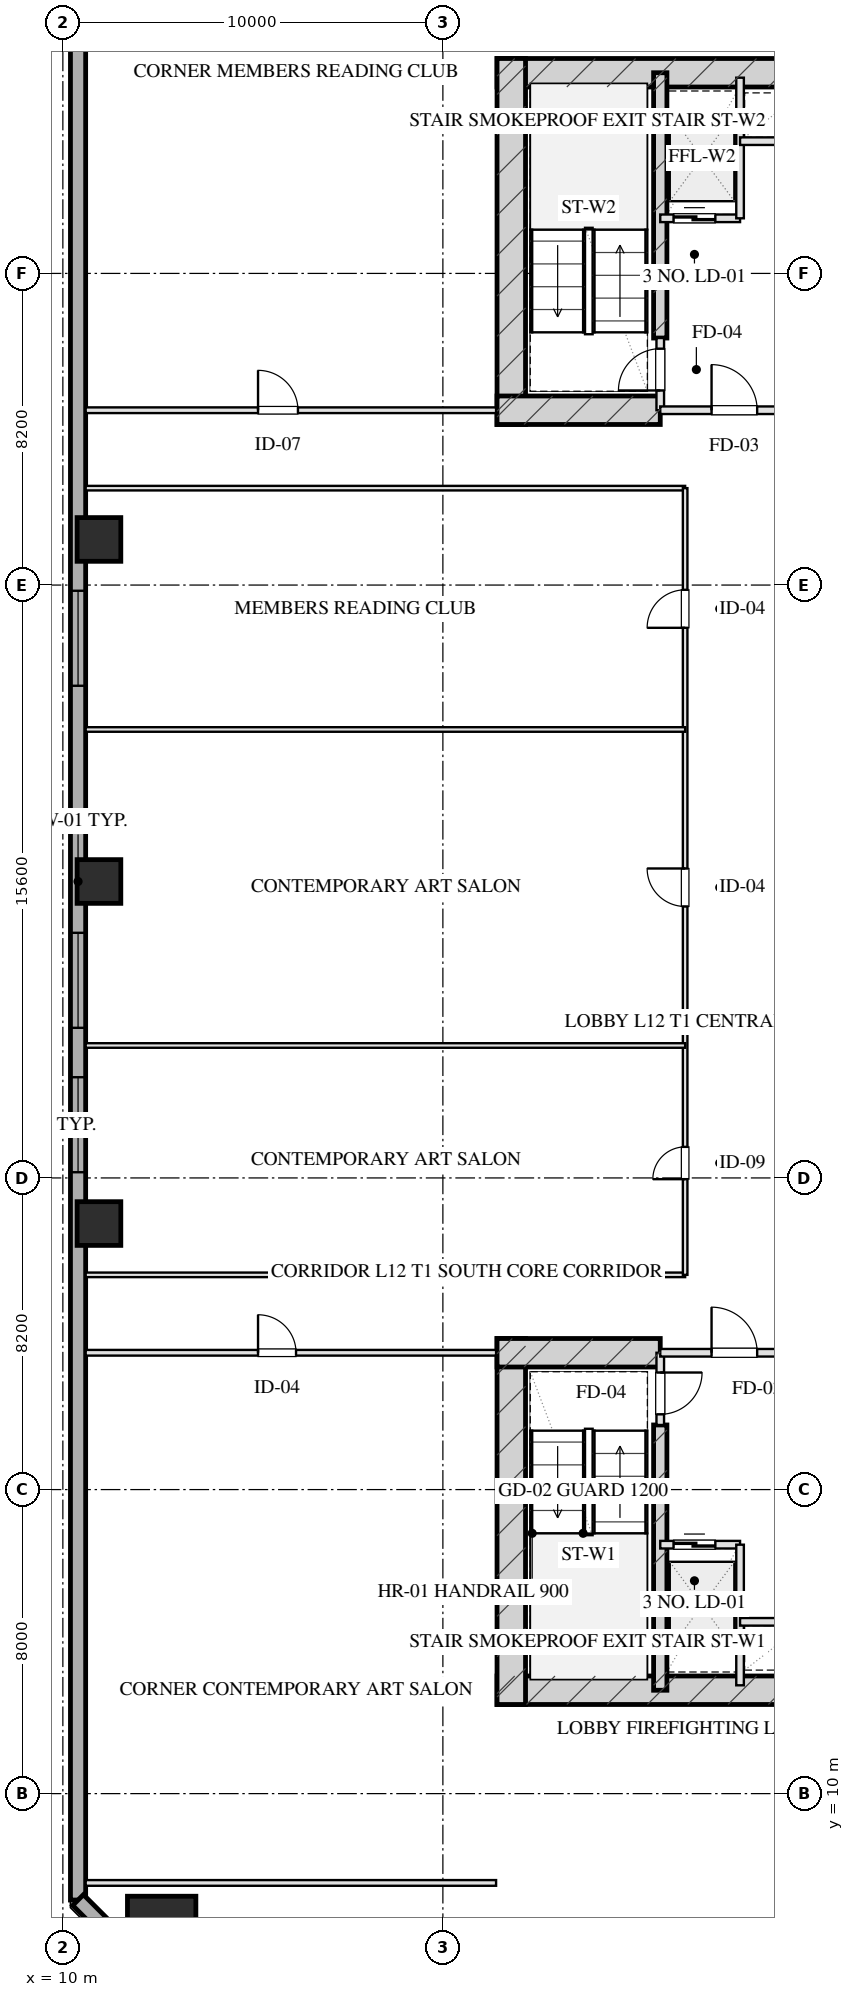
"""IFC4 building model, lengths in metres.
Left out: names, types, materials, properties, quantities, classifications, styles, units other than length and angle.
Written with IfcOpenShell. Run it as: python <this file> out.ifc"""

import sys

from ifc_helpers import new_model, si_unit, direction, frame, frame_2d, origin, origin_2d, place, context, subcontext, project, spatial, rectangle, hollow_rectangle, extrude, element, fill, save


model = new_model("IFC4")
c1 = context("Model", 3, precision=1e-05, world=origin(), true_north=direction((0.0, 1.0)))
c2 = subcontext(c1, "Body", "Model", "MODEL_VIEW")
j1 = project(units=[si_unit("LENGTHUNIT", "METRE"), si_unit("PLANEANGLEUNIT", "RADIAN")], contexts=[c1])
p1 = place(None, origin())
s1 = spatial("IfcSite", under=j1, at=p1, CompositionType="ELEMENT")
p2 = place(p1, origin())
s2 = spatial("IfcBuilding", under=s1, at=p2, CompositionType="ELEMENT")
p3 = place(p2, frame((0.0, 0.0, 54.05)))
s3 = spatial("IfcBuildingStorey", under=s2, at=p3, CompositionType="ELEMENT", Elevation=54.05)
p4 = place(p3, frame((21.425, 12.72, 0.0), z_axis=(0.0, 0.0, 1.0), x_axis=(1.0, 0.0, 0.0)))
e1 = element("IfcWall", 1, at=p4, inside=s3, PredefinedType="SHEAR", context=c2, shape_type="SweptSolid", body=[
    extrude(rectangle(XDim=17.15, YDim=0.75, at=frame_2d((8.575, 0.0))), origin(), (0.0, 0.0, 1.0), 3.45),
])
p5 = place(p3, frame((21.8, 21.975, 0.0), z_axis=(0.0, 0.0, 1.0), x_axis=(0.0, -1.0, 0.0)))
e2 = element("IfcWall", 2, at=p5, inside=s3, PredefinedType="SHEAR", context=c2, shape_type="SweptSolid", body=[
    extrude(rectangle(XDim=9.63, YDim=0.75, at=frame_2d((4.815, 0.0))), origin(), (0.0, 0.0, 1.0), 3.45),
])
p6 = place(p3, frame((25.72, 19.7, 0.0), z_axis=(0.0, 0.0, 1.0), x_axis=(0.0, -1.0, 0.0)))
e3 = element("IfcWall", 3, at=p6, inside=s3, PredefinedType="SHEAR", context=c2, shape_type="SweptSolid", body=[
    extrude(rectangle(XDim=6.98, YDim=0.35, at=frame_2d((3.49, 0.0))), origin(), (0.0, 0.0, 1.0), 3.45),
])
p7 = place(p3, frame((21.425, 21.6, 0.0), z_axis=(0.0, 0.0, 1.0), x_axis=(1.0, 0.0, 0.0)))
e4 = element("IfcWall", 4, at=p7, inside=s3, PredefinedType="SHEAR", context=c2, shape_type="SweptSolid", body=[
    extrude(rectangle(XDim=4.295, YDim=0.75, at=frame_2d((2.147, 0.0))), origin(), (0.0, 0.0, 1.0), 3.45),
])
p8 = place(p3, frame((21.425, 55.28, 0.0), z_axis=(0.0, 0.0, 1.0), x_axis=(1.0, 0.0, 0.0)))
e5 = element("IfcWall", 5, at=p8, inside=s3, PredefinedType="SHEAR", context=c2, shape_type="SweptSolid", body=[
    extrude(rectangle(XDim=17.15, YDim=0.75, at=frame_2d((8.575, 0.0))), origin(), (0.0, 0.0, 1.0), 3.45),
])
p9 = place(p3, frame((21.8, 46.025, 0.0), z_axis=(0.0, 0.0, 1.0), x_axis=(0.0, 1.0, 0.0)))
e6 = element("IfcWall", 6, at=p9, inside=s3, PredefinedType="SHEAR", context=c2, shape_type="SweptSolid", body=[
    extrude(rectangle(XDim=9.63, YDim=0.75, at=frame_2d((4.815, 0.0))), origin(), (0.0, 0.0, 1.0), 3.45),
])
p10 = place(p3, frame((25.72, 48.3, 0.0), z_axis=(0.0, 0.0, 1.0), x_axis=(0.0, 1.0, 0.0)))
e7 = element("IfcWall", 7, at=p10, inside=s3, PredefinedType="SHEAR", context=c2, shape_type="SweptSolid", body=[
    extrude(rectangle(XDim=6.98, YDim=0.35, at=frame_2d((3.49, 0.0))), origin(), (0.0, 0.0, 1.0), 3.45),
])
p11 = place(p3, frame((21.425, 46.4, 0.0), z_axis=(0.0, 0.0, 1.0), x_axis=(1.0, 0.0, 0.0)))
e8 = element("IfcWall", 8, at=p11, inside=s3, PredefinedType="SHEAR", context=c2, shape_type="SweptSolid", body=[
    extrude(rectangle(XDim=4.295, YDim=0.75, at=frame_2d((2.147, 0.0))), origin(), (0.0, 0.0, 1.0), 3.45),
])
p12 = place(p3, frame((12.6, 6.4, 0.0), z_axis=(0.0, 0.0, 1.0), x_axis=(1.0, 0.0, 0.0)))
e9 = element("IfcColumn", 9, at=p12, inside=s3, PredefinedType="COLUMN", context=c2, shape_type="SweptSolid", body=[
    extrude(hollow_rectangle(XDim=1.8, YDim=1.8, WallThickness=0.06, at=origin_2d()), origin(), (0.0, 0.0, 1.0), 3.451),
])
for number, where, z_axis, x_axis in (
    (10, (10.95, 25.0, 0.0), (0.0, 0.0, 1.0), (1.0, 0.0, 0.0)),
    (11, (10.95, 34.0, 0.0), (0.0, 0.0, 1.0), (1.0, 0.0, 0.0)),
    (12, (10.95, 43.0, 0.0), (0.0, 0.0, 1.0), (1.0, 0.0, 0.0)),
):
    element("IfcColumn", number, at=place(p3, frame(where, z_axis=z_axis, x_axis=x_axis)), inside=s3, PredefinedType="COLUMN", context=c2, shape_type="SweptSolid", body=[
        extrude(hollow_rectangle(XDim=1.15, YDim=1.15, WallThickness=0.04, at=origin_2d()), origin(), (0.0, 0.0, 1.0), 3.451),
    ])
p13 = place(p3, frame((10.4, 7.2, 0.0), z_axis=(0.0, 0.0, 1.0), x_axis=(0.0, 1.0, 0.0)))
e13 = element("IfcWall", 13, at=p13, inside=s3, PredefinedType="SOLIDWALL", context=c2, shape_type="SweptSolid", body=[
    extrude(rectangle(XDim=53.6, YDim=0.4, at=frame_2d((26.8, 0.0))), origin(), (0.0, 0.0, 1.0), 2.61),
])
p14 = place(p13, frame((19.15, 0.0, 0.75)))
e14 = element("IfcOpeningElement", 14, at=p14, cuts=e13, PredefinedType="OPENING", context=c2, shape_type="SweptSolid", body=[
    extrude(rectangle(XDim=2.5, YDim=1.46, at=frame_2d((1.25, 0.73))), frame((0.0, 0.21, 0.0), z_axis=(0.0, -1.0, 0.0), x_axis=(1.0, 0.0, 0.0)), (0.0, 0.0, 1.0), 0.42),
])
p15 = place(p13, frame((22.95, 0.0, 0.75)))
e15 = element("IfcOpeningElement", 15, at=p15, cuts=e13, PredefinedType="OPENING", context=c2, shape_type="SweptSolid", body=[
    extrude(rectangle(XDim=2.5, YDim=1.46, at=frame_2d((1.25, 0.73))), frame((0.0, 0.21, 0.0), z_axis=(0.0, -1.0, 0.0), x_axis=(1.0, 0.0, 0.0)), (0.0, 0.0, 1.0), 0.42),
])
p16 = place(p13, frame((31.95, 0.0, 0.75)))
e16 = element("IfcOpeningElement", 16, at=p16, cuts=e13, PredefinedType="OPENING", context=c2, shape_type="SweptSolid", body=[
    extrude(rectangle(XDim=2.5, YDim=1.46, at=frame_2d((1.25, 0.73))), frame((0.0, 0.21, 0.0), z_axis=(0.0, -1.0, 0.0), x_axis=(1.0, 0.0, 0.0)), (0.0, 0.0, 1.0), 0.42),
])
p17 = place(p3, frame((13.4, 4.2, 0.0), z_axis=(0.0, 0.0, 1.0), x_axis=(-0.707106781187, 0.707106781187, 0.0)))
e17 = element("IfcWall", 17, at=p17, inside=s3, PredefinedType="SOLIDWALL", context=c2, shape_type="SweptSolid", body=[
    extrude(rectangle(XDim=4.243, YDim=0.4, at=frame_2d((2.121, 0.0))), origin(), (0.0, 0.0, 1.0), 2.61),
])
p18 = place(p3, frame((25.72, 21.6, 0.0), z_axis=(0.0, 0.0, 1.0), x_axis=(0.0, -1.0, 0.0)))
e18 = element("IfcWall", 18, at=p18, inside=s3, PredefinedType="PARTITIONING", context=c2, shape_type="SweptSolid", body=[
    extrude(rectangle(XDim=1.9, YDim=0.2, at=frame_2d((0.95, 0.0))), origin(), (0.0, 0.0, 1.0), 3.175),
])
p19 = place(p18, frame((0.52, 0.0, 0.0)))
e19 = element("IfcOpeningElement", 19, at=p19, cuts=e18, PredefinedType="OPENING", context=c2, shape_type="SweptSolid", body=[
    extrude(rectangle(XDim=1.1, YDim=2.05, at=frame_2d((0.55, 1.025))), frame((0.0, 0.11, 0.0), z_axis=(0.0, -1.0, 0.0), x_axis=(1.0, 0.0, 0.0)), (0.0, 0.0, 1.0), 0.22),
])
p20 = place(p3, frame((25.72, 21.6, 0.0), z_axis=(0.0, 0.0, 1.0), x_axis=(1.0, 0.0, 0.0)))
e20 = element("IfcWall", 20, at=p20, inside=s3, PredefinedType="PARTITIONING", context=c2, shape_type="SweptSolid", body=[
    extrude(rectangle(XDim=3.83, YDim=0.2, at=frame_2d((1.915, 0.0))), origin(), (0.0, 0.0, 1.0), 3.175),
])
p21 = place(p20, frame((1.35, 0.0, 0.0)))
e21 = element("IfcOpeningElement", 21, at=p21, cuts=e20, PredefinedType="OPENING", context=c2, shape_type="SweptSolid", body=[
    extrude(rectangle(XDim=1.2, YDim=2.05, at=frame_2d((0.6, 1.025))), frame((0.0, 0.11, 0.0), z_axis=(0.0, -1.0, 0.0), x_axis=(1.0, 0.0, 0.0)), (0.0, 0.0, 1.0), 0.22),
])
p22 = place(p3, frame((25.72, 16.55, 0.0), z_axis=(0.0, 0.0, 1.0), x_axis=(1.0, 0.0, 0.0)))
e22 = element("IfcWall", 22, at=p22, inside=s3, PredefinedType="PARTITIONING", context=c2, shape_type="SweptSolid", body=[
    extrude(rectangle(XDim=2.1, YDim=0.2, at=frame_2d((1.05, 0.0))), origin(), (0.0, 0.0, 1.0), 3.175),
])
p23 = place(p22, frame((0.35, 0.0, 0.0)))
e23 = element("IfcOpeningElement", 23, at=p23, cuts=e22, PredefinedType="OPENING", context=c2, shape_type="SweptSolid", body=[
    extrude(rectangle(XDim=1.1, YDim=2.05, at=frame_2d((0.55, 1.025))), frame((0.0, 0.11, 0.0), z_axis=(0.0, -1.0, 0.0), x_axis=(1.0, 0.0, 0.0)), (0.0, 0.0, 1.0), 0.22),
])
p24 = place(p3, frame((27.82, 16.55, 0.0), z_axis=(0.0, 0.0, 1.0), x_axis=(0.0, -1.0, 0.0)))
e24 = element("IfcWall", 24, at=p24, inside=s3, PredefinedType="PARTITIONING", context=c2, shape_type="SweptSolid", body=[
    extrude(rectangle(XDim=3.7, YDim=0.2, at=frame_2d((1.85, 0.0))), origin(), (0.0, 0.0, 1.0), 3.175),
])
p25 = place(p3, frame((27.82, 14.52, 0.0), z_axis=(0.0, 0.0, 1.0), x_axis=(1.0, 0.0, 0.0)))
e25 = element("IfcWall", 25, at=p25, inside=s3, PredefinedType="PARTITIONING", context=c2, shape_type="SweptSolid", body=[
    extrude(rectangle(XDim=1.73, YDim=0.2, at=frame_2d((0.865, 0.0))), origin(), (0.0, 0.0, 1.0), 3.175),
])
p26 = place(p3, frame((25.72, 46.4, 0.0), z_axis=(0.0, 0.0, 1.0), x_axis=(0.0, 1.0, 0.0)))
e26 = element("IfcWall", 26, at=p26, inside=s3, PredefinedType="PARTITIONING", context=c2, shape_type="SweptSolid", body=[
    extrude(rectangle(XDim=1.9, YDim=0.2, at=frame_2d((0.95, 0.0))), origin(), (0.0, 0.0, 1.0), 3.175),
])
p27 = place(p26, frame((0.52, 0.0, 0.0)))
e27 = element("IfcOpeningElement", 27, at=p27, cuts=e26, PredefinedType="OPENING", context=c2, shape_type="SweptSolid", body=[
    extrude(rectangle(XDim=1.1, YDim=2.05, at=frame_2d((0.55, 1.025))), frame((0.0, 0.11, 0.0), z_axis=(0.0, -1.0, 0.0), x_axis=(1.0, 0.0, 0.0)), (0.0, 0.0, 1.0), 0.22),
])
p28 = place(p3, frame((25.72, 46.4, 0.0), z_axis=(0.0, 0.0, 1.0), x_axis=(1.0, 0.0, 0.0)))
e28 = element("IfcWall", 28, at=p28, inside=s3, PredefinedType="PARTITIONING", context=c2, shape_type="SweptSolid", body=[
    extrude(rectangle(XDim=3.83, YDim=0.2, at=frame_2d((1.915, 0.0))), origin(), (0.0, 0.0, 1.0), 3.175),
])
p29 = place(p28, frame((1.35, 0.0, 0.0)))
e29 = element("IfcOpeningElement", 29, at=p29, cuts=e28, PredefinedType="OPENING", context=c2, shape_type="SweptSolid", body=[
    extrude(rectangle(XDim=1.2, YDim=2.05, at=frame_2d((0.6, 1.025))), frame((0.0, 0.11, 0.0), z_axis=(0.0, -1.0, 0.0), x_axis=(1.0, 0.0, 0.0)), (0.0, 0.0, 1.0), 0.22),
])
p30 = place(p3, frame((25.72, 51.45, 0.0), z_axis=(0.0, 0.0, 1.0), x_axis=(1.0, 0.0, 0.0)))
e30 = element("IfcWall", 30, at=p30, inside=s3, PredefinedType="PARTITIONING", context=c2, shape_type="SweptSolid", body=[
    extrude(rectangle(XDim=2.1, YDim=0.2, at=frame_2d((1.05, 0.0))), origin(), (0.0, 0.0, 1.0), 3.175),
])
p31 = place(p30, frame((0.35, 0.0, 0.0)))
e31 = element("IfcOpeningElement", 31, at=p31, cuts=e30, PredefinedType="OPENING", context=c2, shape_type="SweptSolid", body=[
    extrude(rectangle(XDim=1.1, YDim=2.05, at=frame_2d((0.55, 1.025))), frame((0.0, 0.11, 0.0), z_axis=(0.0, -1.0, 0.0), x_axis=(1.0, 0.0, 0.0)), (0.0, 0.0, 1.0), 0.22),
])
p32 = place(p3, frame((27.82, 51.45, 0.0), z_axis=(0.0, 0.0, 1.0), x_axis=(0.0, 1.0, 0.0)))
e32 = element("IfcWall", 32, at=p32, inside=s3, PredefinedType="PARTITIONING", context=c2, shape_type="SweptSolid", body=[
    extrude(rectangle(XDim=3.7, YDim=0.2, at=frame_2d((1.85, 0.0))), origin(), (0.0, 0.0, 1.0), 3.175),
])
p33 = place(p3, frame((27.82, 53.48, 0.0), z_axis=(0.0, 0.0, 1.0), x_axis=(1.0, 0.0, 0.0)))
e33 = element("IfcWall", 33, at=p33, inside=s3, PredefinedType="PARTITIONING", context=c2, shape_type="SweptSolid", body=[
    extrude(rectangle(XDim=1.73, YDim=0.2, at=frame_2d((0.865, 0.0))), origin(), (0.0, 0.0, 1.0), 3.175),
])
p34 = place(p3, frame((10.6, 7.65, 0.0), z_axis=(0.0, 0.0, 1.0), x_axis=(1.0, 0.0, 0.0)))
e34 = element("IfcWall", 34, at=p34, inside=s3, PredefinedType="PARTITIONING", context=c2, shape_type="SweptSolid", body=[
    extrude(rectangle(XDim=10.8, YDim=0.15, at=frame_2d((5.4, 0.0))), origin(), (0.0, 0.0, 1.0), 3.175),
])
p35 = place(p3, frame((10.6, 21.6, 0.0), z_axis=(0.0, 0.0, 1.0), x_axis=(1.0, 0.0, 0.0)))
e35 = element("IfcWall", 35, at=p35, inside=s3, PredefinedType="PARTITIONING", context=c2, shape_type="SweptSolid", body=[
    extrude(rectangle(XDim=10.8, YDim=0.15, at=frame_2d((5.4, 0.0))), origin(), (0.0, 0.0, 1.0), 3.175),
])
p36 = place(p35, frame((4.536, 0.0, 0.0)))
e36 = element("IfcOpeningElement", 36, at=p36, cuts=e35, PredefinedType="OPENING", context=c2, shape_type="SweptSolid", body=[
    extrude(rectangle(XDim=1.0, YDim=2.05, at=frame_2d((0.5, 1.025))), frame((0.0, 0.085, 0.0), z_axis=(0.0, -1.0, 0.0), x_axis=(1.0, 0.0, 0.0)), (0.0, 0.0, 1.0), 0.17),
])
p37 = place(p3, frame((10.6, 46.4, 0.0), z_axis=(0.0, 0.0, 1.0), x_axis=(1.0, 0.0, 0.0)))
e37 = element("IfcWall", 37, at=p37, inside=s3, PredefinedType="PARTITIONING", context=c2, shape_type="SweptSolid", body=[
    extrude(rectangle(XDim=10.8, YDim=0.15, at=frame_2d((5.4, 0.0))), origin(), (0.0, 0.0, 1.0), 3.175),
])
p38 = place(p37, frame((4.536, 0.0, 0.0)))
e38 = element("IfcOpeningElement", 38, at=p38, cuts=e37, PredefinedType="OPENING", context=c2, shape_type="SweptSolid", body=[
    extrude(rectangle(XDim=1.05, YDim=2.05, at=frame_2d((0.525, 1.025))), frame((0.0, 0.085, 0.0), z_axis=(0.0, -1.0, 0.0), x_axis=(1.0, 0.0, 0.0)), (0.0, 0.0, 1.0), 0.17),
])
for number, where, z_axis, x_axis in (
    (39, (10.6, 23.65, 0.0), (0.0, 0.0, 1.0), (1.0, 0.0, 0.0)),
    (40, (10.6, 44.35, 0.0), (0.0, 0.0, 1.0), (1.0, 0.0, 0.0)),
):
    element("IfcWall", number, at=place(p3, frame(where, z_axis=z_axis, x_axis=x_axis)), inside=s3, PredefinedType="PARTITIONING", context=c2, shape_type="SweptSolid", body=[
        extrude(rectangle(XDim=15.775, YDim=0.12, at=frame_2d((7.887, 0.0))), origin(), (0.0, 0.0, 1.0), 3.175),
    ])
p39 = place(p3, frame((26.375, 23.65, 0.0), z_axis=(0.0, 0.0, 1.0), x_axis=(0.0, 1.0, 0.0)))
e41 = element("IfcWall", 41, at=p39, inside=s3, PredefinedType="PARTITIONING", context=c2, shape_type="SweptSolid", body=[
    extrude(rectangle(XDim=20.7, YDim=0.12, at=frame_2d((10.35, 0.0))), origin(), (0.0, 0.0, 1.0), 3.175),
])
p40 = place(p39, frame((2.518, 0.0, 0.0)))
e42 = element("IfcOpeningElement", 42, at=p40, cuts=e41, PredefinedType="OPENING", context=c2, shape_type="SweptSolid", body=[
    extrude(rectangle(XDim=0.85, YDim=2.05, at=frame_2d((0.425, 1.025))), frame((0.0, 0.07, 0.0), z_axis=(0.0, -1.0, 0.0), x_axis=(1.0, 0.0, 0.0)), (0.0, 0.0, 1.0), 0.14),
])
p41 = place(p39, frame((9.692, 0.0, 0.0)))
e43 = element("IfcOpeningElement", 43, at=p41, cuts=e41, PredefinedType="OPENING", context=c2, shape_type="SweptSolid", body=[
    extrude(rectangle(XDim=1.0, YDim=2.05, at=frame_2d((0.5, 1.025))), frame((0.0, 0.07, 0.0), z_axis=(0.0, -1.0, 0.0), x_axis=(1.0, 0.0, 0.0)), (0.0, 0.0, 1.0), 0.14),
])
p42 = place(p39, frame((17.025, 0.0, 0.0)))
e44 = element("IfcOpeningElement", 44, at=p42, cuts=e41, PredefinedType="OPENING", context=c2, shape_type="SweptSolid", body=[
    extrude(rectangle(XDim=1.0, YDim=2.05, at=frame_2d((0.5, 1.025))), frame((0.0, 0.07, 0.0), z_axis=(0.0, -1.0, 0.0), x_axis=(1.0, 0.0, 0.0)), (0.0, 0.0, 1.0), 0.14),
])
for number, where, z_axis, x_axis in (
    (45, (10.6, 29.685, 0.0), (0.0, 0.0, 1.0), (1.0, 0.0, 0.0)),
    (46, (10.6, 38.0, 0.0), (0.0, 0.0, 1.0), (1.0, 0.0, 0.0)),
):
    element("IfcWall", number, at=place(p3, frame(where, z_axis=z_axis, x_axis=x_axis)), inside=s3, PredefinedType="PARTITIONING", context=c2, shape_type="SweptSolid", body=[
        extrude(rectangle(XDim=15.775, YDim=0.12, at=frame_2d((7.887, 0.0))), origin(), (0.0, 0.0, 1.0), 3.175),
    ])
p43 = place(p14, origin())
e47 = element("IfcWindow", 47, at=p43, inside=s3, PartitioningType="TRIPLE_PANEL_VERTICAL", PredefinedType="WINDOW", context=c2, shape_type="SweptSolid", body=[
    extrude(rectangle(XDim=2.5, YDim=1.46, at=frame_2d((1.25, 0.73))), frame((0.0, 0.03, 0.0), z_axis=(0.0, -1.0, 0.0), x_axis=(1.0, 0.0, 0.0)), (0.0, 0.0, 1.0), 0.06),
])
fill(e14, e47)
p44 = place(p15, origin())
e48 = element("IfcWindow", 48, at=p44, inside=s3, PartitioningType="TRIPLE_PANEL_VERTICAL", PredefinedType="WINDOW", context=c2, shape_type="SweptSolid", body=[
    extrude(rectangle(XDim=2.5, YDim=1.46, at=frame_2d((1.25, 0.73))), frame((0.0, 0.03, 0.0), z_axis=(0.0, -1.0, 0.0), x_axis=(1.0, 0.0, 0.0)), (0.0, 0.0, 1.0), 0.06),
])
fill(e15, e48)
p45 = place(p16, origin())
e49 = element("IfcWindow", 49, at=p45, inside=s3, PartitioningType="TRIPLE_PANEL_VERTICAL", PredefinedType="WINDOW", context=c2, shape_type="SweptSolid", body=[
    extrude(rectangle(XDim=2.5, YDim=1.46, at=frame_2d((1.25, 0.73))), frame((0.0, 0.03, 0.0), z_axis=(0.0, -1.0, 0.0), x_axis=(1.0, 0.0, 0.0)), (0.0, 0.0, 1.0), 0.06),
])
fill(e16, e49)
p46 = place(p19, origin())
e50 = element("IfcDoor", 50, at=p46, inside=s3, OperationType="SINGLE_SWING_LEFT", PredefinedType="DOOR", context=c2, shape_type="SweptSolid", body=[
    extrude(rectangle(XDim=1.1, YDim=2.05, at=frame_2d((0.55, 1.025))), frame((0.0, 0.025, 0.0), z_axis=(0.0, -1.0, 0.0), x_axis=(1.0, 0.0, 0.0)), (0.0, 0.0, 1.0), 0.05),
])
fill(e19, e50)
p47 = place(p21, origin())
e51 = element("IfcDoor", 51, at=p47, inside=s3, OperationType="SINGLE_SWING_LEFT", PredefinedType="DOOR", context=c2, shape_type="SweptSolid", body=[
    extrude(rectangle(XDim=1.2, YDim=2.05, at=frame_2d((0.6, 1.025))), frame((0.0, 0.025, 0.0), z_axis=(0.0, -1.0, 0.0), x_axis=(1.0, 0.0, 0.0)), (0.0, 0.0, 1.0), 0.05),
])
fill(e21, e51)
p48 = place(p23, origin())
e52 = element("IfcDoor", 52, at=p48, inside=s3, OperationType="DOUBLE_DOOR_SLIDING", PredefinedType="DOOR", context=c2, shape_type="SweptSolid", body=[
    extrude(rectangle(XDim=1.1, YDim=2.05, at=frame_2d((0.55, 1.025))), frame((0.0, 0.025, 0.0), z_axis=(0.0, -1.0, 0.0), x_axis=(1.0, 0.0, 0.0)), (0.0, 0.0, 1.0), 0.05),
])
fill(e23, e52)
p49 = place(p27, origin())
e53 = element("IfcDoor", 53, at=p49, inside=s3, OperationType="SINGLE_SWING_LEFT", PredefinedType="DOOR", context=c2, shape_type="SweptSolid", body=[
    extrude(rectangle(XDim=1.1, YDim=2.05, at=frame_2d((0.55, 1.025))), frame((0.0, 0.025, 0.0), z_axis=(0.0, -1.0, 0.0), x_axis=(1.0, 0.0, 0.0)), (0.0, 0.0, 1.0), 0.05),
])
fill(e27, e53)
p50 = place(p29, origin())
e54 = element("IfcDoor", 54, at=p50, inside=s3, OperationType="SINGLE_SWING_LEFT", PredefinedType="DOOR", context=c2, shape_type="SweptSolid", body=[
    extrude(rectangle(XDim=1.2, YDim=2.05, at=frame_2d((0.6, 1.025))), frame((0.0, 0.025, 0.0), z_axis=(0.0, -1.0, 0.0), x_axis=(1.0, 0.0, 0.0)), (0.0, 0.0, 1.0), 0.05),
])
fill(e29, e54)
p51 = place(p31, origin())
e55 = element("IfcDoor", 55, at=p51, inside=s3, OperationType="DOUBLE_DOOR_SLIDING", PredefinedType="DOOR", context=c2, shape_type="SweptSolid", body=[
    extrude(rectangle(XDim=1.1, YDim=2.05, at=frame_2d((0.55, 1.025))), frame((0.0, 0.025, 0.0), z_axis=(0.0, -1.0, 0.0), x_axis=(1.0, 0.0, 0.0)), (0.0, 0.0, 1.0), 0.05),
])
fill(e31, e55)
p52 = place(p36, origin())
e56 = element("IfcDoor", 56, at=p52, inside=s3, OperationType="SINGLE_SWING_LEFT", PredefinedType="DOOR", context=c2, shape_type="SweptSolid", body=[
    extrude(rectangle(XDim=1.0, YDim=2.05, at=frame_2d((0.5, 1.025))), frame((0.0, 0.025, 0.0), z_axis=(0.0, -1.0, 0.0), x_axis=(1.0, 0.0, 0.0)), (0.0, 0.0, 1.0), 0.05),
])
fill(e36, e56)
p53 = place(p38, origin())
e57 = element("IfcDoor", 57, at=p53, inside=s3, OperationType="SINGLE_SWING_LEFT", PredefinedType="DOOR", context=c2, shape_type="SweptSolid", body=[
    extrude(rectangle(XDim=1.05, YDim=2.05, at=frame_2d((0.525, 1.025))), frame((0.0, 0.025, 0.0), z_axis=(0.0, -1.0, 0.0), x_axis=(1.0, 0.0, 0.0)), (0.0, 0.0, 1.0), 0.05),
])
fill(e38, e57)
p54 = place(p40, origin())
e58 = element("IfcDoor", 58, at=p54, inside=s3, OperationType="SINGLE_SWING_LEFT", PredefinedType="DOOR", context=c2, shape_type="SweptSolid", body=[
    extrude(rectangle(XDim=0.85, YDim=2.05, at=frame_2d((0.425, 1.025))), frame((0.0, 0.025, 0.0), z_axis=(0.0, -1.0, 0.0), x_axis=(1.0, 0.0, 0.0)), (0.0, 0.0, 1.0), 0.05),
])
fill(e42, e58)
p55 = place(p41, origin())
e59 = element("IfcDoor", 59, at=p55, inside=s3, OperationType="SINGLE_SWING_RIGHT", PredefinedType="DOOR", context=c2, shape_type="SweptSolid", body=[
    extrude(rectangle(XDim=1.0, YDim=2.05, at=frame_2d((0.5, 1.025))), frame((0.0, 0.025, 0.0), z_axis=(0.0, -1.0, 0.0), x_axis=(1.0, 0.0, 0.0)), (0.0, 0.0, 1.0), 0.05),
])
fill(e43, e59)
p56 = place(p42, origin())
e60 = element("IfcDoor", 60, at=p56, inside=s3, OperationType="SINGLE_SWING_LEFT", PredefinedType="DOOR", context=c2, shape_type="SweptSolid", body=[
    extrude(rectangle(XDim=1.0, YDim=2.05, at=frame_2d((0.5, 1.025))), frame((0.0, 0.025, 0.0), z_axis=(0.0, -1.0, 0.0), x_axis=(1.0, 0.0, 0.0)), (0.0, 0.0, 1.0), 0.05),
])
fill(e44, e60)
save(model, sys.argv[1])
